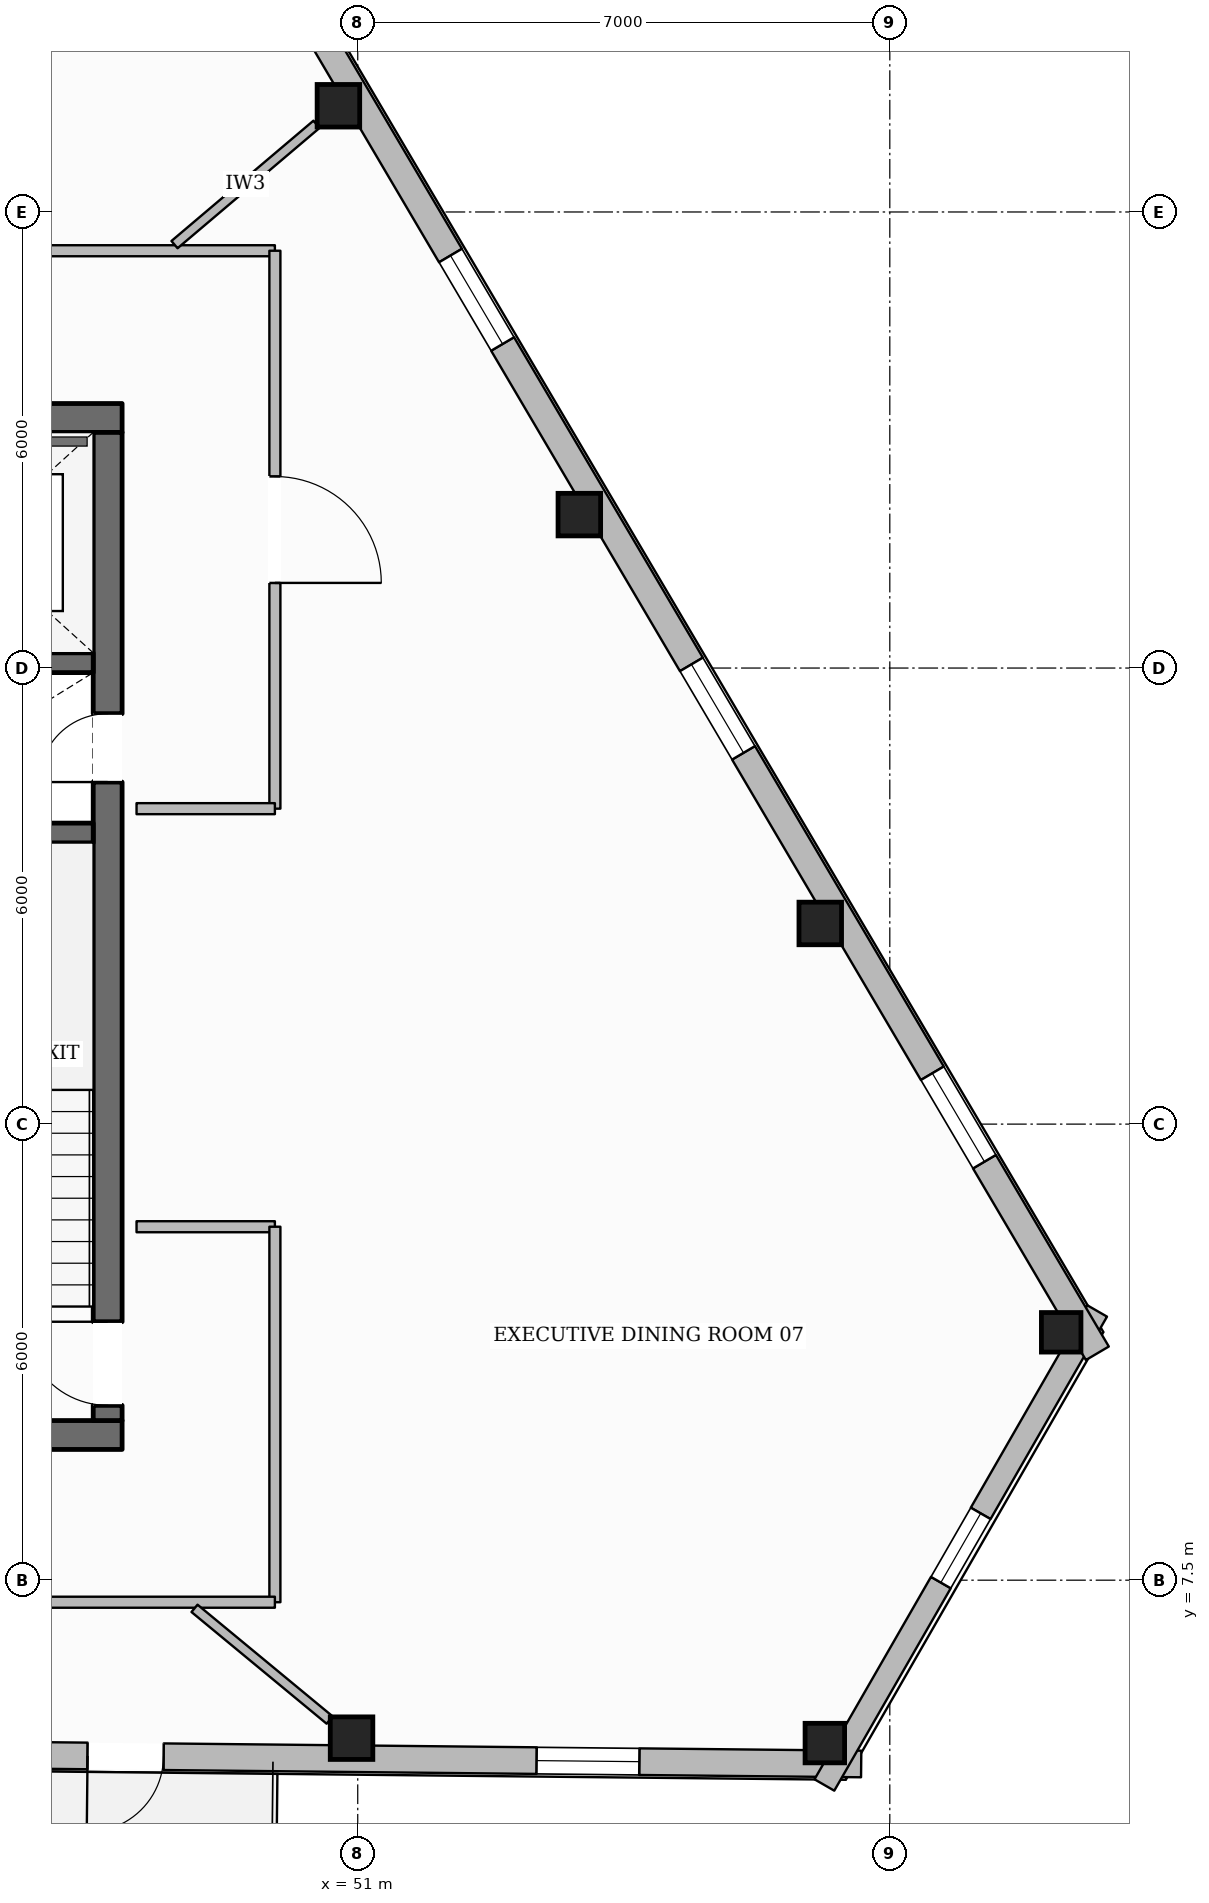
"""IFC4 building model, lengths in metres.
Left out: names, types, materials, properties, quantities, classifications, styles, units other than length and angle.
Written with IfcOpenShell. Run it as: python <this file> out.ifc"""

import sys

from ifc_helpers import new_model, si_unit, direction, frame, frame_2d, origin, origin_2d, place, context, subcontext, project, spatial, rectangle, hollow_rectangle, extrude, element, fill, save


model = new_model("IFC4")
c1 = context("Model", 3, precision=1e-05, world=origin(), true_north=direction((0.0, 1.0)))
c2 = subcontext(c1, "Body", "Model", "MODEL_VIEW")
j1 = project(units=[si_unit("LENGTHUNIT", "METRE"), si_unit("PLANEANGLEUNIT", "RADIAN")], contexts=[c1])
p1 = place(None, origin())
s1 = spatial("IfcSite", under=j1, at=p1, CompositionType="ELEMENT")
p2 = place(p1, origin())
s2 = spatial("IfcBuilding", under=s1, at=p2, CompositionType="ELEMENT")
p3 = place(p2, frame((0.0, 0.0, 262.6)))
s3 = spatial("IfcBuildingStorey", under=s2, at=p3, CompositionType="ELEMENT", Elevation=262.6)
p4 = place(p3, frame((28.1, 9.41, 0.0), z_axis=(0.0, 0.0, 1.0), x_axis=(1.0, 0.0, 0.0)))
e1 = element("IfcWall", 1, at=p4, inside=s3, PredefinedType="SOLIDWALL", context=c2, shape_type="SweptSolid", body=[
    extrude(rectangle(XDim=19.8, YDim=0.38, at=frame_2d((9.9, 0.0))), origin(), (0.0, 0.0, 1.0), 3.61),
])
p5 = place(p4, frame((10.4, 0.0, 0.0)))
e2 = element("IfcOpeningElement", 2, at=p5, cuts=e1, PredefinedType="OPENING", context=c2, shape_type="SweptSolid", body=[
    extrude(rectangle(XDim=1.4, YDim=2.2, at=frame_2d((0.7, 1.1))), frame((0.0, 0.2, 0.0), z_axis=(0.0, -1.0, 0.0), x_axis=(1.0, 0.0, 0.0)), (0.0, 0.0, 1.0), 0.4),
])
p6 = place(p3, frame((28.1, 22.79, 0.0), z_axis=(0.0, 0.0, 1.0), x_axis=(1.0, 0.0, 0.0)))
e3 = element("IfcWall", 3, at=p6, inside=s3, PredefinedType="SOLIDWALL", context=c2, shape_type="SweptSolid", body=[
    extrude(rectangle(XDim=19.8, YDim=0.38, at=frame_2d((9.9, 0.0))), origin(), (0.0, 0.0, 1.0), 3.61),
])
p7 = place(p6, frame((6.175, 0.0, 0.0)))
e4 = element("IfcOpeningElement", 4, at=p7, cuts=e3, PredefinedType="OPENING", context=c2, shape_type="SweptSolid", body=[
    extrude(rectangle(XDim=1.05, YDim=2.15, at=frame_2d((0.525, 1.075))), frame((0.0, 0.2, 0.0), z_axis=(0.0, -1.0, 0.0), x_axis=(1.0, 0.0, 0.0)), (0.0, 0.0, 1.0), 0.4),
])
p8 = place(p6, frame((12.575, 0.0, 0.0)))
e5 = element("IfcOpeningElement", 5, at=p8, cuts=e3, PredefinedType="OPENING", context=c2, shape_type="SweptSolid", body=[
    extrude(rectangle(XDim=1.05, YDim=2.15, at=frame_2d((0.525, 1.075))), frame((0.0, 0.2, 0.0), z_axis=(0.0, -1.0, 0.0), x_axis=(1.0, 0.0, 0.0)), (0.0, 0.0, 1.0), 0.4),
])
p9 = place(p3, frame((47.71, 9.6, 0.0), z_axis=(0.0, 0.0, 1.0), x_axis=(0.0, 1.0, 0.0)))
e6 = element("IfcWall", 6, at=p9, inside=s3, PredefinedType="SOLIDWALL", context=c2, shape_type="SweptSolid", body=[
    extrude(rectangle(XDim=13.0, YDim=0.38, at=frame_2d((6.5, 0.0))), origin(), (0.0, 0.0, 1.0), 3.61),
])
p10 = place(p9, frame((0.2, 0.0, 0.0)))
e7 = element("IfcOpeningElement", 7, at=p10, cuts=e6, PredefinedType="OPENING", context=c2, shape_type="SweptSolid", body=[
    extrude(rectangle(XDim=1.1, YDim=2.15, at=frame_2d((0.55, 1.075))), frame((0.0, 0.2, 0.0), z_axis=(0.0, -1.0, 0.0), x_axis=(1.0, 0.0, 0.0)), (0.0, 0.0, 1.0), 0.4),
])
p11 = place(p9, frame((8.4, 0.0, 0.0)))
e8 = element("IfcOpeningElement", 8, at=p11, cuts=e6, PredefinedType="OPENING", context=c2, shape_type="SweptSolid", body=[
    extrude(rectangle(XDim=0.9, YDim=2.1, at=frame_2d((0.45, 1.05))), frame((0.0, 0.2, 0.0), z_axis=(0.0, -1.0, 0.0), x_axis=(1.0, 0.0, 0.0)), (0.0, 0.0, 1.0), 0.4),
])
for number, where, z_axis, x_axis in (
    (9, (44.32, 17.33, 0.0), (0.0, 0.0, 1.0), (1.0, 0.0, 0.0)),
    (10, (44.32, 19.57, 0.0), (0.0, 0.0, 1.0), (1.0, 0.0, 0.0)),
):
    element("IfcWall", number, at=place(p3, frame(where, z_axis=z_axis, x_axis=x_axis)), inside=s3, PredefinedType="SHEAR", context=c2, shape_type="SweptSolid", body=[
        extrude(rectangle(XDim=3.2, YDim=0.26, at=frame_2d((1.6, 0.0))), origin(), (0.0, 0.0, 1.0), 3.61),
    ])
p12 = place(p3, frame((50.919, 5.422, 0.0), z_axis=(0.0, 0.0, 1.0), x_axis=(1.0, 0.0, 0.0)))
e11 = element("IfcColumn", 11, at=p12, inside=s3, PredefinedType="COLUMN", context=c2, shape_type="SweptSolid", body=[
    extrude(hollow_rectangle(XDim=0.56, YDim=0.56, WallThickness=0.025, at=origin_2d()), origin(), (0.0, 0.0, 1.0), 3.61),
])
for number, where, z_axis, x_axis in (
    (12, (57.145, 5.357, 0.0), (0.0, 0.0, 1.0), (1.0, 0.0, 0.0)),
    (13, (60.255, 10.761, 0.0), (0.0, 0.0, 1.0), (1.0, 0.0, 0.0)),
):
    element("IfcColumn", number, at=place(p3, frame(where, z_axis=z_axis, x_axis=x_axis)), inside=s3, PredefinedType="COLUMN", context=c2, shape_type="SweptSolid", body=[
        extrude(hollow_rectangle(XDim=0.52, YDim=0.52, WallThickness=0.024, at=origin_2d()), origin(), (0.0, 0.0, 1.0), 3.61),
    ])
for number, where, z_axis, x_axis in (
    (14, (57.085, 16.14, 0.0), (0.0, 0.0, 1.0), (1.0, 0.0, 0.0)),
    (15, (53.915, 21.519, 0.0), (0.0, 0.0, 1.0), (1.0, 0.0, 0.0)),
    (16, (50.746, 26.897, 0.0), (0.0, 0.0, 1.0), (1.0, 0.0, 0.0)),
):
    element("IfcColumn", number, at=place(p3, frame(where, z_axis=z_axis, x_axis=x_axis)), inside=s3, PredefinedType="COLUMN", context=c2, shape_type="SweptSolid", body=[
        extrude(hollow_rectangle(XDim=0.56, YDim=0.56, WallThickness=0.025, at=origin_2d()), origin(), (0.0, 0.0, 1.0), 3.61),
    ])
p13 = place(p3, frame((57.623, 5.082, 0.0), z_axis=(0.0, 0.0, 1.0), x_axis=(-0.999946058155, 0.010386567308, 0.0)))
e17 = element("IfcWall", 17, at=p13, inside=s3, PredefinedType="STANDARD", context=c2, shape_type="SweptSolid", body=[
    extrude(rectangle(XDim=38.314, YDim=0.35, at=frame_2d((19.157, 0.0))), origin(), (0.0, 0.0, 1.0), 3.196),
])
p14 = place(p13, frame((9.178, 0.0, 0.0)))
e18 = element("IfcOpeningElement", 18, at=p14, cuts=e17, PredefinedType="OPENING", context=c2, shape_type="SweptSolid", body=[
    extrude(rectangle(XDim=1.0, YDim=2.2, at=frame_2d((0.5, 1.1))), frame((0.0, 0.185, 0.0), z_axis=(0.0, -1.0, 0.0), x_axis=(1.0, 0.0, 0.0)), (0.0, 0.0, 1.0), 0.37),
])
p15 = place(p13, frame((34.054, 0.0, 0.65)))
e19 = element("IfcOpeningElement", 19, at=p15, cuts=e17, PredefinedType="OPENING", context=c2, shape_type="SweptSolid", body=[
    extrude(rectangle(XDim=1.35, YDim=1.75, at=frame_2d((0.675, 0.875))), frame((0.0, 0.185, 0.0), z_axis=(0.0, -1.0, 0.0), x_axis=(1.0, 0.0, 0.0)), (0.0, 0.0, 1.0), 0.37),
])
p16 = place(p13, frame((27.827, 0.0, 0.65)))
e20 = element("IfcOpeningElement", 20, at=p16, cuts=e17, PredefinedType="OPENING", context=c2, shape_type="SweptSolid", body=[
    extrude(rectangle(XDim=1.35, YDim=1.75, at=frame_2d((0.675, 0.875))), frame((0.0, 0.185, 0.0), z_axis=(0.0, -1.0, 0.0), x_axis=(1.0, 0.0, 0.0)), (0.0, 0.0, 1.0), 0.37),
])
p17 = place(p13, frame((21.601, 0.0, 0.65)))
e21 = element("IfcOpeningElement", 21, at=p17, cuts=e17, PredefinedType="OPENING", context=c2, shape_type="SweptSolid", body=[
    extrude(rectangle(XDim=1.35, YDim=1.75, at=frame_2d((0.675, 0.875))), frame((0.0, 0.185, 0.0), z_axis=(0.0, -1.0, 0.0), x_axis=(1.0, 0.0, 0.0)), (0.0, 0.0, 1.0), 0.37),
])
p18 = place(p13, frame((2.919, 0.0, 0.65)))
e22 = element("IfcOpeningElement", 22, at=p18, cuts=e17, PredefinedType="OPENING", context=c2, shape_type="SweptSolid", body=[
    extrude(rectangle(XDim=1.35, YDim=1.75, at=frame_2d((0.675, 0.875))), frame((0.0, 0.185, 0.0), z_axis=(0.0, -1.0, 0.0), x_axis=(1.0, 0.0, 0.0)), (0.0, 0.0, 1.0), 0.37),
])
p19 = place(p3, frame((60.728, 11.042, 0.0), z_axis=(0.0, 0.0, 1.0), x_axis=(-0.498716541594, -0.866765141858, 0.0)))
e23 = element("IfcWall", 23, at=p19, inside=s3, PredefinedType="STANDARD", context=c2, shape_type="SweptSolid", body=[
    extrude(rectangle(XDim=7.195, YDim=0.3, at=frame_2d((3.598, 0.0))), origin(), (0.0, 0.0, 1.0), 3.196),
])
p20 = place(p19, frame((3.073, 0.0, 0.65)))
e24 = element("IfcOpeningElement", 24, at=p20, cuts=e23, PredefinedType="OPENING", context=c2, shape_type="SweptSolid", body=[
    extrude(rectangle(XDim=1.05, YDim=1.7, at=frame_2d((0.525, 0.85))), frame((0.0, 0.16, 0.0), z_axis=(0.0, -1.0, 0.0), x_axis=(1.0, 0.0, 0.0)), (0.0, 0.0, 1.0), 0.32),
])
p21 = place(p3, frame((41.23, 43.577, 0.0), z_axis=(0.0, 0.0, 1.0), x_axis=(0.507689696002, -0.861540000565, 0.0)))
e25 = element("IfcWall", 25, at=p21, inside=s3, PredefinedType="STANDARD", context=c2, shape_type="SweptSolid", body=[
    extrude(rectangle(XDim=38.41, YDim=0.35, at=frame_2d((19.205, 0.0))), origin(), (0.0, 0.0, 1.0), 3.196),
])
p22 = place(p21, frame((34.134, 0.0, 0.65)))
e26 = element("IfcOpeningElement", 26, at=p22, cuts=e25, PredefinedType="OPENING", context=c2, shape_type="SweptSolid", body=[
    extrude(rectangle(XDim=1.35, YDim=1.75, at=frame_2d((0.675, 0.875))), frame((0.0, 0.185, 0.0), z_axis=(0.0, -1.0, 0.0), x_axis=(1.0, 0.0, 0.0)), (0.0, 0.0, 1.0), 0.37),
])
p23 = place(p21, frame((27.89, 0.0, 0.65)))
e27 = element("IfcOpeningElement", 27, at=p23, cuts=e25, PredefinedType="OPENING", context=c2, shape_type="SweptSolid", body=[
    extrude(rectangle(XDim=1.35, YDim=1.75, at=frame_2d((0.675, 0.875))), frame((0.0, 0.185, 0.0), z_axis=(0.0, -1.0, 0.0), x_axis=(1.0, 0.0, 0.0)), (0.0, 0.0, 1.0), 0.37),
])
p24 = place(p21, frame((21.647, 0.0, 0.65)))
e28 = element("IfcOpeningElement", 28, at=p24, cuts=e25, PredefinedType="OPENING", context=c2, shape_type="SweptSolid", body=[
    extrude(rectangle(XDim=1.35, YDim=1.75, at=frame_2d((0.675, 0.875))), frame((0.0, 0.185, 0.0), z_axis=(0.0, -1.0, 0.0), x_axis=(1.0, 0.0, 0.0)), (0.0, 0.0, 1.0), 0.37),
])
p25 = place(p21, frame((9.161, 0.0, 0.65)))
e29 = element("IfcOpeningElement", 29, at=p25, cuts=e25, PredefinedType="OPENING", context=c2, shape_type="SweptSolid", body=[
    extrude(rectangle(XDim=1.35, YDim=1.75, at=frame_2d((0.675, 0.875))), frame((0.0, 0.185, 0.0), z_axis=(0.0, -1.0, 0.0), x_axis=(1.0, 0.0, 0.0)), (0.0, 0.0, 1.0), 0.37),
])
p26 = place(p21, frame((2.917, 0.0, 0.65)))
e30 = element("IfcOpeningElement", 30, at=p26, cuts=e25, PredefinedType="OPENING", context=c2, shape_type="SweptSolid", body=[
    extrude(rectangle(XDim=1.35, YDim=1.75, at=frame_2d((0.675, 0.875))), frame((0.0, 0.185, 0.0), z_axis=(0.0, -1.0, 0.0), x_axis=(1.0, 0.0, 0.0)), (0.0, 0.0, 1.0), 0.37),
])
p27 = place(p3, frame((45.2, 24.99, 0.0), z_axis=(0.0, 0.0, 1.0), x_axis=(1.0, 0.0, 0.0)))
e31 = element("IfcWall", 31, at=p27, inside=s3, PredefinedType="PARTITIONING", context=c2, shape_type="SweptSolid", body=[
    extrude(rectangle(XDim=4.71, YDim=0.145, at=frame_2d((2.355, 0.0))), origin(), (0.0, 0.0, 1.0), 3.61),
])
p28 = place(p3, frame((49.91, 24.99, 0.0), z_axis=(0.0, 0.0, 1.0), x_axis=(0.0, -1.0, 0.0)))
e32 = element("IfcWall", 32, at=p28, inside=s3, PredefinedType="PARTITIONING", context=c2, shape_type="SweptSolid", body=[
    extrude(rectangle(XDim=7.34, YDim=0.145, at=frame_2d((3.67, 0.0))), origin(), (0.0, 0.0, 1.0), 3.349),
])
p29 = place(p28, frame((2.97, 0.0, 0.0)))
e33 = element("IfcOpeningElement", 33, at=p29, cuts=e32, PredefinedType="OPENING", context=c2, shape_type="SweptSolid", body=[
    extrude(rectangle(XDim=1.4, YDim=2.2, at=frame_2d((0.7, 1.1))), frame((0.0, 0.083, 0.0), z_axis=(0.0, -1.0, 0.0), x_axis=(1.0, 0.0, 0.0)), (0.0, 0.0, 1.0), 0.165),
])
for number, where, z_axis, x_axis in (
    (34, (49.91, 17.65, 0.0), (0.0, 0.0, 1.0), (-1.0, 0.0, 0.0)),
    (35, (48.09, 12.15, 0.0), (0.0, 0.0, 1.0), (1.0, 0.0, 0.0)),
):
    element("IfcWall", number, at=place(p3, frame(where, z_axis=z_axis, x_axis=x_axis)), inside=s3, PredefinedType="PARTITIONING", context=c2, shape_type="SweptSolid", body=[
        extrude(rectangle(XDim=1.82, YDim=0.145, at=frame_2d((0.91, 0.0))), origin(), (0.0, 0.0, 1.0), 3.61),
    ])
p30 = place(p3, frame((49.91, 12.15, 0.0), z_axis=(0.0, 0.0, 1.0), x_axis=(0.0, -1.0, 0.0)))
e36 = element("IfcWall", 36, at=p30, inside=s3, PredefinedType="PARTITIONING", context=c2, shape_type="SweptSolid", body=[
    extrude(rectangle(XDim=4.94, YDim=0.145, at=frame_2d((2.47, 0.0))), origin(), (0.0, 0.0, 1.0), 3.61),
])
p31 = place(p3, frame((49.91, 7.21, 0.0), z_axis=(0.0, 0.0, 1.0), x_axis=(-1.0, 0.0, 0.0)))
e37 = element("IfcWall", 37, at=p31, inside=s3, PredefinedType="PARTITIONING", context=c2, shape_type="SweptSolid", body=[
    extrude(rectangle(XDim=23.82, YDim=0.145, at=frame_2d((11.91, 0.0))), origin(), (0.0, 0.0, 1.0), 3.61),
])
p32 = place(p31, frame((8.499, 0.0, 0.0)))
e38 = element("IfcOpeningElement", 38, at=p32, cuts=e37, PredefinedType="OPENING", context=c2, shape_type="SweptSolid", body=[
    extrude(rectangle(XDim=0.98, YDim=2.15, at=frame_2d((0.49, 1.075))), frame((0.0, 0.083, 0.0), z_axis=(0.0, -1.0, 0.0), x_axis=(1.0, 0.0, 0.0)), (0.0, 0.0, 1.0), 0.165),
])
p33 = place(p3, frame((48.589, 25.071, 0.0), z_axis=(0.0, 0.0, 1.0), x_axis=(0.763023110228, 0.646371203921, 0.0)))
e39 = element("IfcWall", 39, at=p33, inside=s3, PredefinedType="PARTITIONING", context=c2, shape_type="SweptSolid", body=[
    extrude(rectangle(XDim=2.449, YDim=0.125, at=frame_2d((1.224, 0.0))), origin(), (0.0, 0.0, 1.0), 3.61),
])
p34 = place(p3, frame((48.853, 7.129, 0.0), z_axis=(0.0, 0.0, 1.0), x_axis=(0.770826164976, -0.637045542632, 0.0)))
e40 = element("IfcWall", 40, at=p34, inside=s3, PredefinedType="PARTITIONING", context=c2, shape_type="SweptSolid", body=[
    extrude(rectangle(XDim=2.307, YDim=0.125, at=frame_2d((1.153, 0.0))), origin(), (0.0, 0.0, 1.0), 3.246),
])
p35 = place(p14, origin())
e41 = element("IfcDoor", 41, at=p35, inside=s3, OperationType="SINGLE_SWING_RIGHT", PredefinedType="DOOR", context=c2, shape_type="SweptSolid", body=[
    extrude(rectangle(XDim=1.0, YDim=2.2, at=frame_2d((0.5, 1.1))), frame((0.0, 0.025, 0.0), z_axis=(0.0, -1.0, 0.0), x_axis=(1.0, 0.0, 0.0)), (0.0, 0.0, 1.0), 0.05),
])
fill(e18, e41)
p36 = place(p18, origin())
e42 = element("IfcWindow", 42, at=p36, inside=s3, PartitioningType="SINGLE_PANEL", PredefinedType="WINDOW", context=c2, shape_type="SweptSolid", body=[
    extrude(rectangle(XDim=1.35, YDim=1.75, at=frame_2d((0.675, 0.875))), frame((0.0, 0.03, 0.0), z_axis=(0.0, -1.0, 0.0), x_axis=(1.0, 0.0, 0.0)), (0.0, 0.0, 1.0), 0.06),
])
fill(e22, e42)
p37 = place(p22, origin())
e43 = element("IfcWindow", 43, at=p37, inside=s3, PartitioningType="SINGLE_PANEL", PredefinedType="WINDOW", context=c2, shape_type="SweptSolid", body=[
    extrude(rectangle(XDim=1.35, YDim=1.75, at=frame_2d((0.675, 0.875))), frame((0.0, 0.03, 0.0), z_axis=(0.0, -1.0, 0.0), x_axis=(1.0, 0.0, 0.0)), (0.0, 0.0, 1.0), 0.06),
])
fill(e26, e43)
p38 = place(p23, origin())
e44 = element("IfcWindow", 44, at=p38, inside=s3, PartitioningType="SINGLE_PANEL", PredefinedType="WINDOW", context=c2, shape_type="SweptSolid", body=[
    extrude(rectangle(XDim=1.35, YDim=1.75, at=frame_2d((0.675, 0.875))), frame((0.0, 0.03, 0.0), z_axis=(0.0, -1.0, 0.0), x_axis=(1.0, 0.0, 0.0)), (0.0, 0.0, 1.0), 0.06),
])
fill(e27, e44)
p39 = place(p24, origin())
e45 = element("IfcWindow", 45, at=p39, inside=s3, PartitioningType="SINGLE_PANEL", PredefinedType="WINDOW", context=c2, shape_type="SweptSolid", body=[
    extrude(rectangle(XDim=1.35, YDim=1.75, at=frame_2d((0.675, 0.875))), frame((0.0, 0.03, 0.0), z_axis=(0.0, -1.0, 0.0), x_axis=(1.0, 0.0, 0.0)), (0.0, 0.0, 1.0), 0.06),
])
fill(e28, e45)
p40 = place(p20, origin())
e46 = element("IfcWindow", 46, at=p40, inside=s3, PartitioningType="SINGLE_PANEL", PredefinedType="WINDOW", context=c2, shape_type="SweptSolid", body=[
    extrude(rectangle(XDim=1.05, YDim=1.7, at=frame_2d((0.525, 0.85))), frame((0.0, 0.03, 0.0), z_axis=(0.0, -1.0, 0.0), x_axis=(1.0, 0.0, 0.0)), (0.0, 0.0, 1.0), 0.06),
])
fill(e24, e46)
p41 = place(p10, origin())
e47 = element("IfcDoor", 47, at=p41, inside=s3, OperationType="SINGLE_SWING_RIGHT", PredefinedType="DOOR", context=c2, shape_type="SweptSolid", body=[
    extrude(rectangle(XDim=1.1, YDim=2.15, at=frame_2d((0.55, 1.075))), frame((0.0, 0.025, 0.0), z_axis=(0.0, -1.0, 0.0), x_axis=(1.0, 0.0, 0.0)), (0.0, 0.0, 1.0), 0.05),
])
fill(e7, e47)
p42 = place(p11, origin())
e48 = element("IfcDoor", 48, at=p42, inside=s3, OperationType="SINGLE_SWING_LEFT", PredefinedType="DOOR", context=c2, shape_type="SweptSolid", body=[
    extrude(rectangle(XDim=0.9, YDim=2.1, at=frame_2d((0.45, 1.05))), frame((0.0, 0.025, 0.0), z_axis=(0.0, -1.0, 0.0), x_axis=(1.0, 0.0, 0.0)), (0.0, 0.0, 1.0), 0.05),
])
fill(e8, e48)
p43 = place(p29, origin())
e49 = element("IfcDoor", 49, at=p43, inside=s3, OperationType="SINGLE_SWING_RIGHT", PredefinedType="DOOR", context=c2, shape_type="SweptSolid", body=[
    extrude(rectangle(XDim=1.4, YDim=2.2, at=frame_2d((0.7, 1.1))), frame((0.0, 0.025, 0.0), z_axis=(0.0, -1.0, 0.0), x_axis=(1.0, 0.0, 0.0)), (0.0, 0.0, 1.0), 0.05),
])
fill(e33, e49)
save(model, sys.argv[1])
